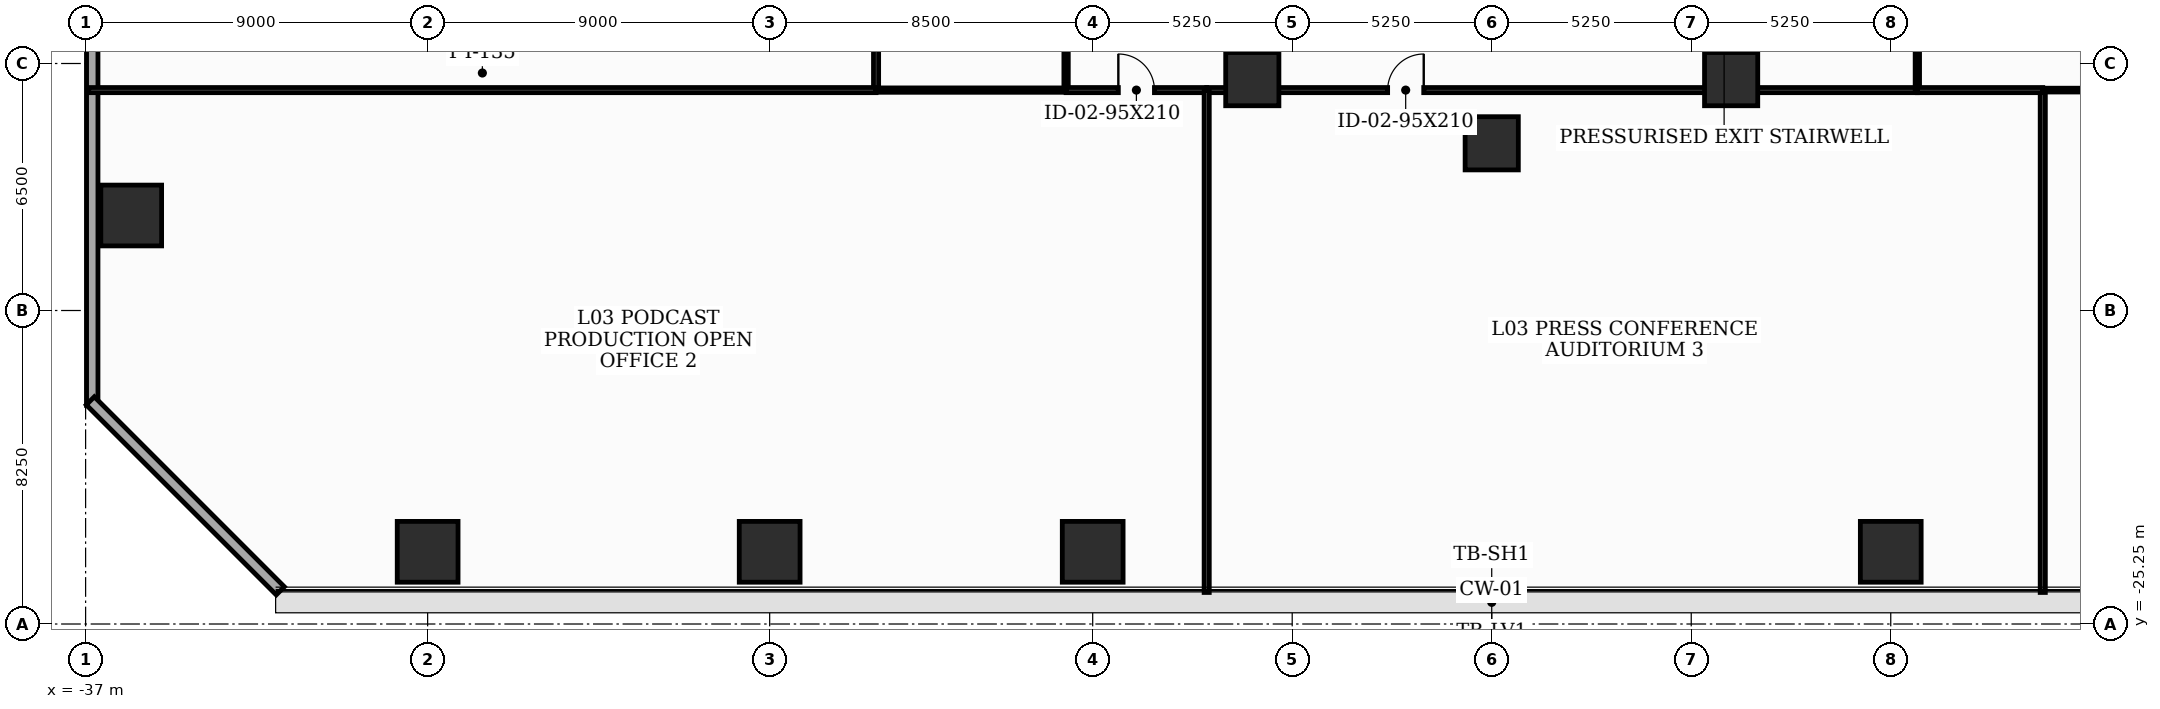
"""IFC4 building model, lengths in metres.
Left out: names, types, materials, properties, quantities, classifications, styles, units other than length and angle.
Written with IfcOpenShell. Run it as: python <this file> out.ifc"""

import sys

from ifc_helpers import new_model, si_unit, direction, frame, frame_2d, origin, origin_2d, place, context, subcontext, project, spatial, rectangle, extrude, element, fill, save


model = new_model("IFC4")
c1 = context("Model", 3, precision=1e-05, world=origin(), true_north=direction((0.0, 1.0)))
c2 = subcontext(c1, "Body", "Model", "MODEL_VIEW")
j1 = project(units=[si_unit("LENGTHUNIT", "METRE"), si_unit("PLANEANGLEUNIT", "RADIAN")], contexts=[c1])
p1 = place(None, origin())
s1 = spatial("IfcSite", under=j1, at=p1, CompositionType="ELEMENT")
p2 = place(p1, origin())
s2 = spatial("IfcBuilding", under=s1, at=p2, CompositionType="ELEMENT")
p3 = place(p2, frame((0.0, 0.0, 15.6)))
s3 = spatial("IfcBuildingStorey", under=s2, at=p3, CompositionType="ELEMENT", Elevation=15.6)
for number, where, z_axis, x_axis in (
    (1, (-6.3, -10.912, 0.0), (0.0, 0.0, 1.0), (1.0, 0.0, 0.0)),
    (2, (0.0, -12.6, 0.0), (0.0, 0.0, 1.0), (1.0, 0.0, 0.0)),
    (3, (6.3, -10.912, 0.0), (0.0, 0.0, 1.0), (1.0, 0.0, 0.0)),
):
    element("IfcColumn", number, at=place(p3, frame(where, z_axis=z_axis, x_axis=x_axis)), inside=s3, PredefinedType="COLUMN", context=c2, shape_type="SweptSolid", body=[
        extrude(rectangle(XDim=1.4, YDim=1.4, at=origin_2d()), origin(), (0.0, 0.0, 1.0), 5.2),
    ])
for number, where, z_axis, x_axis in (
    (4, (-28.0, -23.35, 0.0), (0.0, 0.0, 1.0), (1.0, 0.0, 0.0)),
    (5, (-19.0, -23.35, 0.0), (0.0, 0.0, 1.0), (1.0, 0.0, 0.0)),
    (6, (-10.5, -23.35, 0.0), (0.0, 0.0, 1.0), (1.0, 0.0, 0.0)),
    (7, (10.5, -23.35, 0.0), (0.0, 0.0, 1.0), (1.0, 0.0, 0.0)),
    (8, (-35.8, -14.5, 0.0), (0.0, 0.0, 1.0), (1.0, 0.0, 0.0)),
):
    element("IfcColumn", number, at=place(p3, frame(where, z_axis=z_axis, x_axis=x_axis)), inside=s3, PredefinedType="COLUMN", context=c2, shape_type="SweptSolid", body=[
        extrude(rectangle(XDim=1.6, YDim=1.6, at=origin_2d()), origin(), (0.0, 0.0, 1.0), 5.2),
    ])
p4 = place(p3, frame((-36.825, 28.5, 0.0), z_axis=(0.0, 0.0, 1.0), x_axis=(0.0, -1.0, 0.0)))
e9 = element("IfcWall", 9, at=p4, inside=s3, PredefinedType="SOLIDWALL", context=c2, shape_type="SweptSolid", body=[
    extrude(rectangle(XDim=48.0, YDim=0.3, at=frame_2d((24.0, 0.0))), origin(), (0.0, 0.0, 1.0), 4.95),
])
p5 = place(p4, frame((6.2, 0.0, 0.9)))
e10 = element("IfcOpeningElement", 10, at=p5, cuts=e9, PredefinedType="OPENING", context=c2, shape_type="SweptSolid", body=[
    extrude(rectangle(XDim=2.4, YDim=1.35, at=frame_2d((1.2, 0.675))), frame((0.0, 0.16, 0.0), z_axis=(0.0, -1.0, 0.0), x_axis=(1.0, 0.0, 0.0)), (0.0, 0.0, 1.0), 0.32),
])
p6 = place(p4, frame((19.2, 0.0, 0.9)))
e11 = element("IfcOpeningElement", 11, at=p6, cuts=e9, PredefinedType="OPENING", context=c2, shape_type="SweptSolid", body=[
    extrude(rectangle(XDim=1.8, YDim=1.35, at=frame_2d((0.9, 0.675))), frame((0.0, 0.16, 0.0), z_axis=(0.0, -1.0, 0.0), x_axis=(1.0, 0.0, 0.0)), (0.0, 0.0, 1.0), 0.32),
])
p7 = place(p4, frame((36.2, 0.0, 0.9)))
e12 = element("IfcOpeningElement", 12, at=p7, cuts=e9, PredefinedType="OPENING", context=c2, shape_type="SweptSolid", body=[
    extrude(rectangle(XDim=2.4, YDim=1.35, at=frame_2d((1.2, 0.675))), frame((0.0, 0.16, 0.0), z_axis=(0.0, -1.0, 0.0), x_axis=(1.0, 0.0, 0.0)), (0.0, 0.0, 1.0), 0.32),
])
p8 = place(p3, frame((-36.876, -19.376, 0.0), z_axis=(0.0, 0.0, 1.0), x_axis=(0.707106781187, -0.707106781187, 0.0)))
e13 = element("IfcWall", 13, at=p8, inside=s3, PredefinedType="SOLIDWALL", context=c2, shape_type="SweptSolid", body=[
    extrude(rectangle(XDim=7.071, YDim=0.3, at=frame_2d((3.536, 0.0))), origin(), (0.0, 0.0, 1.0), 4.95),
])
p9 = place(p3, frame((-11.2, -7.4, 0.0), z_axis=(0.0, 0.0, 1.0), x_axis=(0.0, -1.0, 0.0)))
e14 = element("IfcWall", 14, at=p9, inside=s3, PredefinedType="PARTITIONING", context=c2, shape_type="SweptSolid", body=[
    extrude(rectangle(XDim=3.8, YDim=0.115, at=frame_2d((1.9, 0.0))), origin(), (0.0, 0.0, 1.0), 4.95),
])
p10 = place(p9, frame((1.44, 0.0, 0.0)))
e15 = element("IfcOpeningElement", 15, at=p10, cuts=e14, PredefinedType="OPENING", context=c2, shape_type="SweptSolid", body=[
    extrude(rectangle(XDim=0.92, YDim=2.1, at=frame_2d((0.46, 1.05))), frame((0.0, 0.067, 0.0), z_axis=(0.0, -1.0, 0.0), x_axis=(1.0, 0.0, 0.0)), (0.0, 0.0, 1.0), 0.135),
])
p11 = place(p3, frame((-11.2, -11.2, 0.0), z_axis=(0.0, 0.0, 1.0), x_axis=(1.0, 0.0, 0.0)))
e16 = element("IfcWall", 16, at=p11, inside=s3, PredefinedType="PARTITIONING", context=c2, shape_type="SweptSolid", body=[
    extrude(rectangle(XDim=3.7, YDim=0.135, at=frame_2d((1.85, 0.0))), origin(), (0.0, 0.0, 1.0), 4.95),
])
p12 = place(p11, frame((1.375, 0.0, 0.0)))
e17 = element("IfcOpeningElement", 17, at=p12, cuts=e16, PredefinedType="OPENING", context=c2, shape_type="SweptSolid", body=[
    extrude(rectangle(XDim=0.95, YDim=2.1, at=frame_2d((0.475, 1.05))), frame((0.0, 0.077, 0.0), z_axis=(0.0, -1.0, 0.0), x_axis=(1.0, 0.0, 0.0)), (0.0, 0.0, 1.0), 0.155),
])
p13 = place(p3, frame((-7.5, -11.2, 0.0), z_axis=(0.0, 0.0, 1.0), x_axis=(1.0, 0.0, 0.0)))
e18 = element("IfcWall", 18, at=p13, inside=s3, PredefinedType="PARTITIONING", context=c2, shape_type="SweptSolid", body=[
    extrude(rectangle(XDim=18.7, YDim=0.135, at=frame_2d((9.35, 0.0))), origin(), (0.0, 0.0, 1.0), 3.435),
])
p14 = place(p13, frame((4.761, 0.0, 0.0)))
e19 = element("IfcOpeningElement", 19, at=p14, cuts=e18, PredefinedType="OPENING", context=c2, shape_type="SweptSolid", body=[
    extrude(rectangle(XDim=0.95, YDim=2.1, at=frame_2d((0.475, 1.05))), frame((0.0, 0.077, 0.0), z_axis=(0.0, -1.0, 0.0), x_axis=(1.0, 0.0, 0.0)), (0.0, 0.0, 1.0), 0.155),
])
p15 = place(p3, frame((11.2, -11.2, 0.0), z_axis=(0.0, 0.0, 1.0), x_axis=(0.0, 1.0, 0.0)))
e20 = element("IfcWall", 20, at=p15, inside=s3, PredefinedType="PARTITIONING", context=c2, shape_type="SweptSolid", body=[
    extrude(rectangle(XDim=3.8, YDim=0.115, at=frame_2d((1.9, 0.0))), origin(), (0.0, 0.0, 1.0), 4.95),
])
p16 = place(p15, frame((1.44, 0.0, 0.0)))
e21 = element("IfcOpeningElement", 21, at=p16, cuts=e20, PredefinedType="OPENING", context=c2, shape_type="SweptSolid", body=[
    extrude(rectangle(XDim=0.92, YDim=2.1, at=frame_2d((0.46, 1.05))), frame((0.0, 0.067, 0.0), z_axis=(0.0, -1.0, 0.0), x_axis=(1.0, 0.0, 0.0)), (0.0, 0.0, 1.0), 0.135),
])
p17 = place(p3, frame((-16.2, -11.2, 0.0), z_axis=(0.0, 0.0, 1.0), x_axis=(0.0, 1.0, 0.0)))
e22 = element("IfcWall", 22, at=p17, inside=s3, PredefinedType="PARTITIONING", context=c2, shape_type="SweptSolid", body=[
    extrude(rectangle(XDim=3.8, YDim=0.135, at=frame_2d((1.9, 0.0))), origin(), (0.0, 0.0, 1.0), 4.95),
])
p18 = place(p3, frame((-36.92, -11.2, 0.0), z_axis=(0.0, 0.0, 1.0), x_axis=(1.0, 0.0, 0.0)))
e23 = element("IfcWall", 23, at=p18, inside=s3, PredefinedType="PARTITIONING", context=c2, shape_type="SweptSolid", body=[
    extrude(rectangle(XDim=20.72, YDim=0.135, at=frame_2d((10.36, 0.0))), origin(), (0.0, 0.0, 1.0), 3.435),
])
p19 = place(p3, frame((-16.2, -11.2, 0.0), z_axis=(0.0, 0.0, 1.0), x_axis=(1.0, 0.0, 0.0)))
e24 = element("IfcWall", 24, at=p19, inside=s3, PredefinedType="PARTITIONING", context=c2, shape_type="SweptSolid", body=[
    extrude(rectangle(XDim=5.0, YDim=0.115, at=frame_2d((2.5, 0.0))), origin(), (0.0, 0.0, 1.0), 4.95),
])
for number, where, z_axis, x_axis in (
    (25, (-7.5, -24.42, 0.0), (0.0, 0.0, 1.0), (0.0, 1.0, 0.0)),
    (26, (14.5, -24.42, 0.0), (0.0, 0.0, 1.0), (0.0, 1.0, 0.0)),
):
    element("IfcWall", number, at=place(p3, frame(where, z_axis=z_axis, x_axis=x_axis)), inside=s3, PredefinedType="PARTITIONING", context=c2, shape_type="SweptSolid", body=[
        extrude(rectangle(XDim=13.22, YDim=0.135, at=frame_2d((6.61, 0.0))), origin(), (0.0, 0.0, 1.0), 3.435),
    ])
p20 = place(p3, frame((14.5, -11.2, 0.0), z_axis=(0.0, 0.0, 1.0), x_axis=(-1.0, 0.0, 0.0)))
e27 = element("IfcWall", 27, at=p20, inside=s3, PredefinedType="PARTITIONING", context=c2, shape_type="SweptSolid", body=[
    extrude(rectangle(XDim=3.3, YDim=0.135, at=frame_2d((1.65, 0.0))), origin(), (0.0, 0.0, 1.0), 4.95),
])
p21 = place(p3, frame((15.6, -11.2, 0.0), z_axis=(0.0, 0.0, 1.0), x_axis=(-1.0, 0.0, 0.0)))
e28 = element("IfcWall", 28, at=p21, inside=s3, PredefinedType="MOVABLE", context=c2, shape_type="SweptSolid", body=[
    extrude(rectangle(XDim=1.1, YDim=0.1, at=frame_2d((0.55, 0.0))), origin(), (0.0, 0.0, 1.0), 4.95),
])
p22 = place(p12, origin())
e29 = element("IfcDoor", 29, at=p22, inside=s3, OperationType="SINGLE_SWING_LEFT", PredefinedType="DOOR", context=c2, shape_type="SweptSolid", body=[
    extrude(rectangle(XDim=0.95, YDim=2.1, at=frame_2d((0.475, 1.05))), frame((0.0, 0.025, 0.0), z_axis=(0.0, -1.0, 0.0), x_axis=(1.0, 0.0, 0.0)), (0.0, 0.0, 1.0), 0.05),
])
fill(e17, e29)
p23 = place(p14, origin())
e30 = element("IfcDoor", 30, at=p23, inside=s3, OperationType="SINGLE_SWING_RIGHT", PredefinedType="DOOR", context=c2, shape_type="SweptSolid", body=[
    extrude(rectangle(XDim=0.95, YDim=2.1, at=frame_2d((0.475, 1.05))), frame((0.0, 0.025, 0.0), z_axis=(0.0, -1.0, 0.0), x_axis=(1.0, 0.0, 0.0)), (0.0, 0.0, 1.0), 0.05),
])
fill(e19, e30)
save(model, sys.argv[1])
